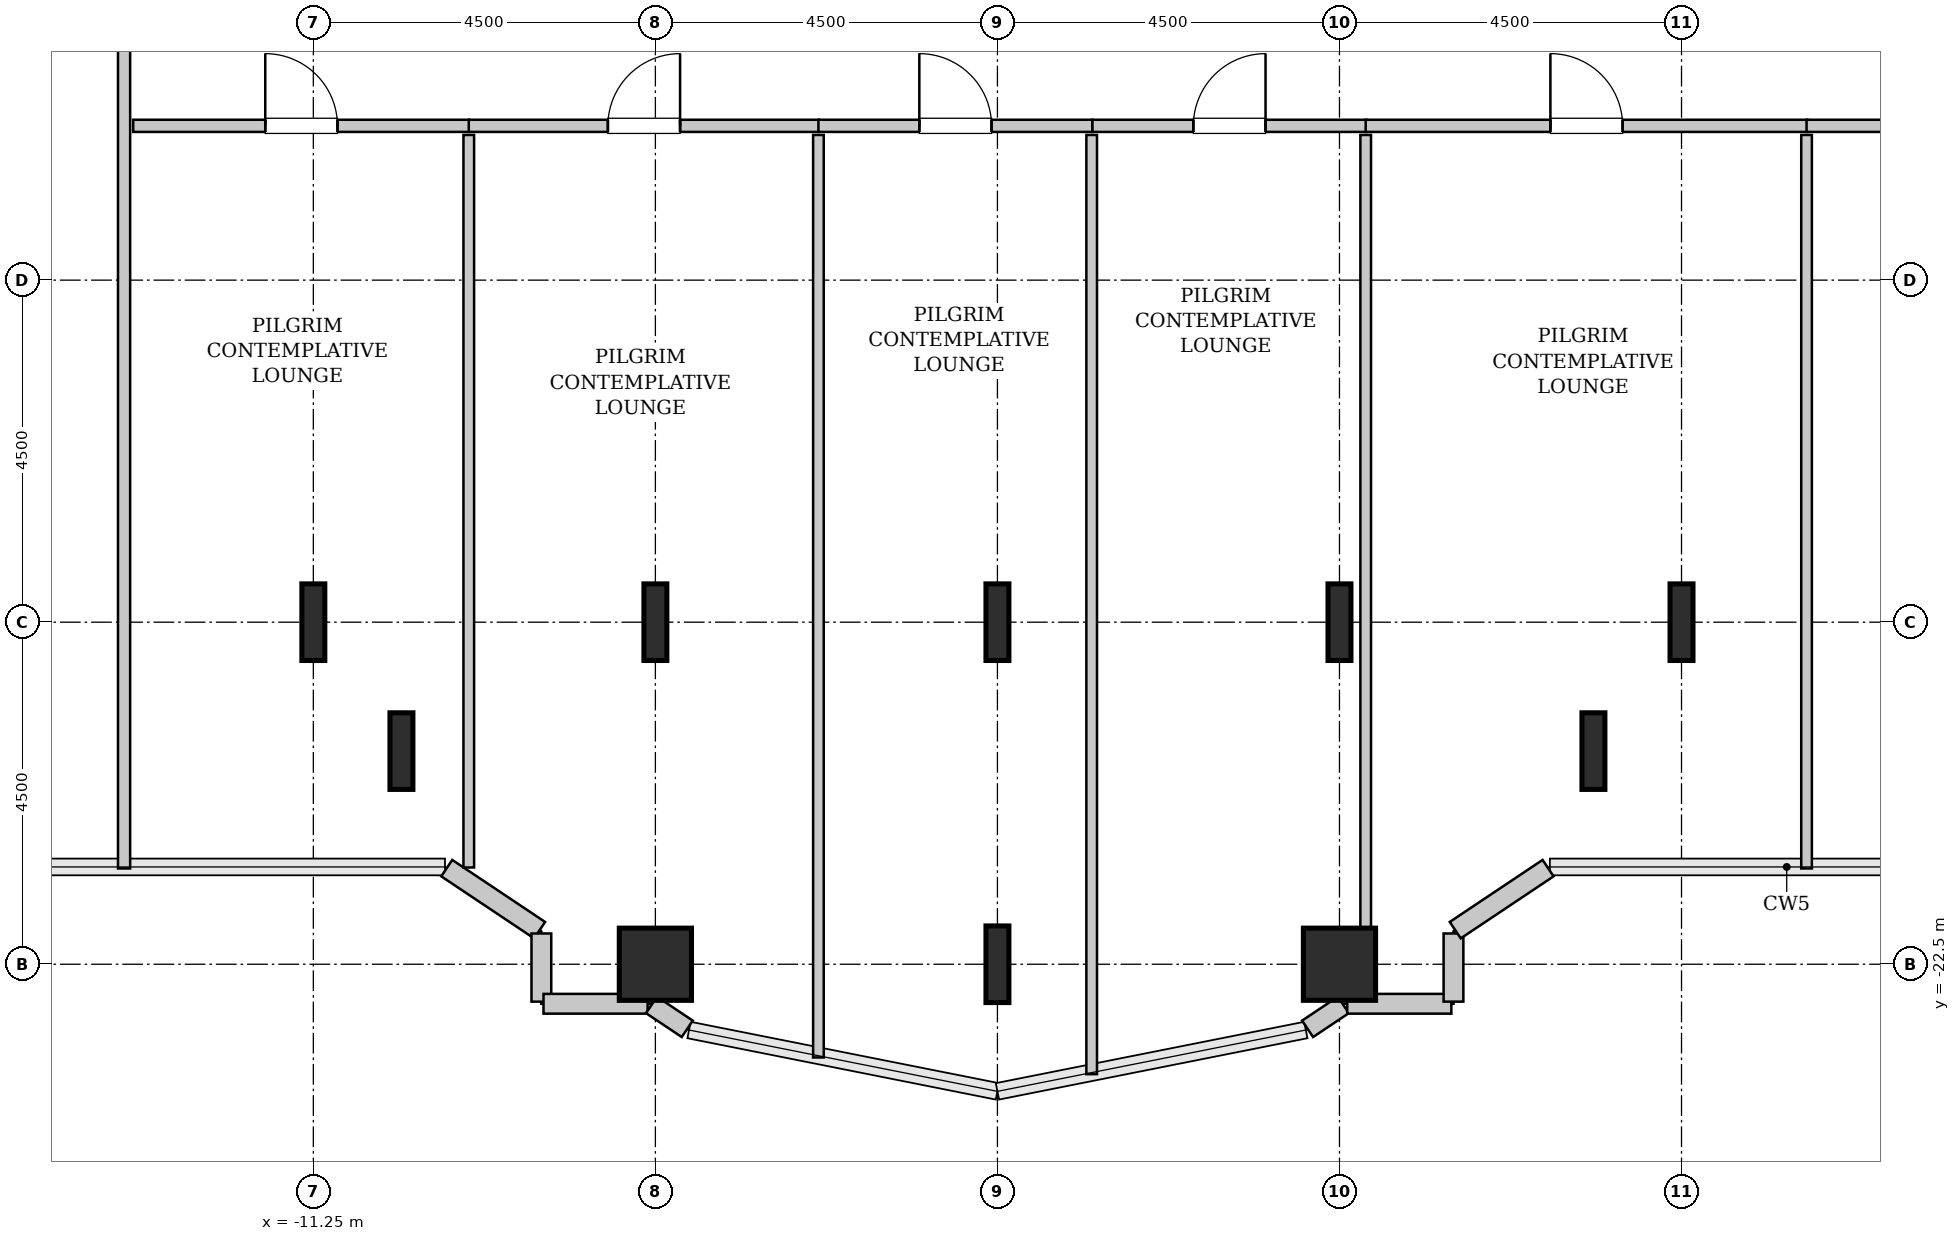
"""IFC4 building model, lengths in metres.
Left out: names, types, materials, properties, quantities, classifications, styles, units other than length and angle.
Written with IfcOpenShell. Run it as: python <this file> out.ifc"""

import sys

from ifc_helpers import new_model, si_unit, direction, frame, frame_2d, origin, origin_2d, place, context, subcontext, project, spatial, rectangle, hollow_rectangle, i_section, extrude, source, transform, mapped, element, fill, save


model = new_model("IFC4")
c1 = context("Model", 3, precision=1e-05, world=origin(), true_north=direction((0.0, 1.0)))
c2 = subcontext(c1, "Body", "Model", "MODEL_VIEW")
j1 = project(units=[si_unit("LENGTHUNIT", "METRE"), si_unit("PLANEANGLEUNIT", "RADIAN")], contexts=[c1])
p1 = place(None, origin())
s1 = spatial("IfcSite", under=j1, at=p1, CompositionType="ELEMENT")
p2 = place(p1, origin())
s2 = spatial("IfcBuilding", under=s1, at=p2, CompositionType="ELEMENT")
p3 = place(p2, frame((0.0, 0.0, 36.8)))
s3 = spatial("IfcBuildingStorey", under=s2, at=p3, CompositionType="ELEMENT", Elevation=36.8)
m1 = source(origin(), c2, "Body", "SweptSolid", [
    extrude(i_section(OverallWidth=0.302, OverallDepth=1.008, WebThickness=0.021, FlangeThickness=0.04, FilletRadius=0.03, at=origin_2d()), origin(), (0.0, 0.0, 1.0), 3.8),
])
for number, where, z_axis, x_axis in (
    (1, (-11.25, -18.0, 0.0), (0.0, 0.0, 1.0), (1.0, 0.0, 0.0)),
    (2, (-10.091, -19.696, 0.0), (0.0, 0.0, 1.0), (1.0, 0.0, 0.0)),
):
    element("IfcColumn", number, at=place(p3, frame(where, z_axis=z_axis, x_axis=x_axis)), inside=s3, PredefinedType="COLUMN", context=c2, shape_type="MappedRepresentation", body=[
        mapped(m1, transform((0.0, 0.0, 0.0), x_axis=(1.0, 0.0, 0.0), y_axis=(0.0, 1.0, 0.0), z_axis=(0.0, 0.0, 1.0), scale=1.0)),
    ])
m2 = source(origin(), c2, "Body", "SweptSolid", [
    extrude(hollow_rectangle(XDim=0.95, YDim=0.95, WallThickness=0.045, InnerFilletRadius=0.045, OuterFilletRadius=0.09, at=origin_2d()), origin(), (0.0, 0.0, 1.0), 3.8),
])
p4 = place(p3, frame((-6.75, -22.5, 0.0), z_axis=(0.0, 0.0, 1.0), x_axis=(1.0, 0.0, 0.0)))
e3 = element("IfcColumn", 3, at=p4, inside=s3, PredefinedType="COLUMN", context=c2, shape_type="MappedRepresentation", body=[
    mapped(m2, transform((0.0, 0.0, 0.0), x_axis=(1.0, 0.0, 0.0), y_axis=(0.0, 1.0, 0.0), z_axis=(0.0, 0.0, 1.0), scale=1.0)),
])
for number, where, z_axis, x_axis in (
    (4, (-6.75, -18.0, 0.0), (0.0, 0.0, 1.0), (1.0, 0.0, 0.0)),
    (5, (-2.25, -22.5, 0.0), (0.0, 0.0, 1.0), (1.0, 0.0, 0.0)),
    (6, (-2.25, -18.0, 0.0), (0.0, 0.0, 1.0), (1.0, 0.0, 0.0)),
):
    element("IfcColumn", number, at=place(p3, frame(where, z_axis=z_axis, x_axis=x_axis)), inside=s3, PredefinedType="COLUMN", context=c2, shape_type="MappedRepresentation", body=[
        mapped(m1, transform((0.0, 0.0, 0.0), x_axis=(1.0, 0.0, 0.0), y_axis=(0.0, 1.0, 0.0), z_axis=(0.0, 0.0, 1.0), scale=1.0)),
    ])
p5 = place(p3, frame((2.25, -22.5, 0.0), z_axis=(0.0, 0.0, 1.0), x_axis=(1.0, 0.0, 0.0)))
e7 = element("IfcColumn", 7, at=p5, inside=s3, PredefinedType="COLUMN", context=c2, shape_type="MappedRepresentation", body=[
    mapped(m2, transform((0.0, 0.0, 0.0), x_axis=(1.0, 0.0, 0.0), y_axis=(0.0, 1.0, 0.0), z_axis=(0.0, 0.0, 1.0), scale=1.0)),
])
for number, where, z_axis, x_axis in (
    (8, (2.25, -18.0, 0.0), (0.0, 0.0, 1.0), (1.0, 0.0, 0.0)),
    (9, (5.591, -19.696, 0.0), (0.0, 0.0, 1.0), (1.0, 0.0, 0.0)),
    (10, (6.75, -18.0, 0.0), (0.0, 0.0, 1.0), (1.0, 0.0, 0.0)),
):
    element("IfcColumn", number, at=place(p3, frame(where, z_axis=z_axis, x_axis=x_axis)), inside=s3, PredefinedType="COLUMN", context=c2, shape_type="MappedRepresentation", body=[
        mapped(m1, transform((0.0, 0.0, 0.0), x_axis=(1.0, 0.0, 0.0), y_axis=(0.0, 1.0, 0.0), z_axis=(0.0, 0.0, 1.0), scale=1.0)),
    ])
m3 = source(origin(), c2, "Body", "SweptSolid", [
    extrude(rectangle(XDim=1.469, YDim=0.26, at=frame_2d((0.734, 0.0))), origin(), (0.0, 0.0, 1.0), 3.55),
])
p6 = place(p3, frame((-9.495, -21.236, 0.0), z_axis=(0.0, 0.0, 1.0), x_axis=(0.831461760506, -0.555581983884, 0.0)))
e11 = element("IfcWall", 11, at=p6, inside=s3, PredefinedType="SOLIDWALL", context=c2, shape_type="MappedRepresentation", body=[
    mapped(m3, transform((0.0, 0.0, 0.0), x_axis=(1.0, 0.0, 0.0), y_axis=(0.0, 1.0, 0.0), z_axis=(0.0, 0.0, 1.0), scale=1.0)),
])
m4 = source(origin(), c2, "Body", "SweptSolid", [
    extrude(rectangle(XDim=0.897, YDim=0.26, at=frame_2d((0.448, 0.0))), origin(), (0.0, 0.0, 1.0), 3.55),
])
p7 = place(p3, frame((-8.25, -22.095, 0.0), z_axis=(0.0, 0.0, 1.0), x_axis=(0.0, -1.0, 0.0)))
e12 = element("IfcWall", 12, at=p7, inside=s3, PredefinedType="SOLIDWALL", context=c2, shape_type="MappedRepresentation", body=[
    mapped(m4, transform((0.0, 0.0, 0.0), x_axis=(1.0, 0.0, 0.0), y_axis=(0.0, 1.0, 0.0), z_axis=(0.0, 0.0, 1.0), scale=1.0)),
])
m5 = source(origin(), c2, "Body", "SweptSolid", [
    extrude(rectangle(XDim=1.37, YDim=0.26, at=frame_2d((0.685, 0.0))), origin(), (0.0, 0.0, 1.0), 3.55),
])
p8 = place(p3, frame((-8.222, -23.02, 0.0), z_axis=(0.0, 0.0, 1.0), x_axis=(1.0, 0.0, 0.0)))
e13 = element("IfcWall", 13, at=p8, inside=s3, PredefinedType="SOLIDWALL", context=c2, shape_type="MappedRepresentation", body=[
    mapped(m5, transform((0.0, 0.0, 0.0), x_axis=(1.0, 0.0, 0.0), y_axis=(0.0, 1.0, 0.0), z_axis=(0.0, 0.0, 1.0), scale=1.0)),
])
m6 = source(origin(), c2, "Body", "SweptSolid", [
    extrude(rectangle(XDim=0.565, YDim=0.26, at=frame_2d((0.283, 0.0))), origin(), (0.0, 0.0, 1.0), 3.55),
])
for number, where, z_axis, x_axis in (
    (14, (-6.801, -23.036, 0.0), (0.0, 0.0, 1.0), (0.832, -0.555, 0.0)),
    (15, (1.831, -23.35, 0.0), (0.0, 0.0, 1.0), (0.832, 0.555, 0.0)),
):
    element("IfcWall", number, at=place(p3, frame(where, z_axis=z_axis, x_axis=x_axis)), inside=s3, PredefinedType="SOLIDWALL", context=c2, shape_type="MappedRepresentation", body=[
        mapped(m6, transform((0.0, 0.0, 0.0), x_axis=(1.0, 0.0, 0.0), y_axis=(0.0, 1.0, 0.0), z_axis=(0.0, 0.0, 1.0), scale=1.0)),
    ])
p9 = place(p3, frame((2.352, -23.02, 0.0), z_axis=(0.0, 0.0, 1.0), x_axis=(1.0, 0.0, 0.0)))
e16 = element("IfcWall", 16, at=p9, inside=s3, PredefinedType="SOLIDWALL", context=c2, shape_type="MappedRepresentation", body=[
    mapped(m5, transform((0.0, 0.0, 0.0), x_axis=(1.0, 0.0, 0.0), y_axis=(0.0, 1.0, 0.0), z_axis=(0.0, 0.0, 1.0), scale=1.0)),
])
p10 = place(p3, frame((3.75, -22.992, 0.0), z_axis=(0.0, 0.0, 1.0), x_axis=(0.0, 1.0, 0.0)))
e17 = element("IfcWall", 17, at=p10, inside=s3, PredefinedType="SOLIDWALL", context=c2, shape_type="MappedRepresentation", body=[
    mapped(m4, transform((0.0, 0.0, 0.0), x_axis=(1.0, 0.0, 0.0), y_axis=(0.0, 1.0, 0.0), z_axis=(0.0, 0.0, 1.0), scale=1.0)),
])
p11 = place(p3, frame((3.773, -22.052, 0.0), z_axis=(0.0, 0.0, 1.0), x_axis=(0.831461760506, 0.555581983884, 0.0)))
e18 = element("IfcWall", 18, at=p11, inside=s3, PredefinedType="SOLIDWALL", context=c2, shape_type="MappedRepresentation", body=[
    mapped(m3, transform((0.0, 0.0, 0.0), x_axis=(1.0, 0.0, 0.0), y_axis=(0.0, 1.0, 0.0), z_axis=(0.0, 0.0, 1.0), scale=1.0)),
])
m7 = source(origin(), c2, "Body", "SweptSolid", [
    extrude(rectangle(XDim=13.045, YDim=0.16, at=frame_2d((6.522, 0.0))), origin(), (0.0, 0.0, 1.0), 3.535),
])
p12 = place(p3, frame((-13.74, -21.24, 0.0), z_axis=(0.0, 0.0, 1.0), x_axis=(0.0, 1.0, 0.0)))
e19 = element("IfcWall", 19, at=p12, inside=s3, PredefinedType="PARTITIONING", context=c2, shape_type="MappedRepresentation", body=[
    mapped(m7, transform((0.0, 0.0, 0.0), x_axis=(1.0, 0.0, 0.0), y_axis=(0.0, 1.0, 0.0), z_axis=(0.0, 0.0, 1.0), scale=1.0)),
])
p13 = place(p12, frame((10.913, 0.0, 0.0)))
e20 = element("IfcOpeningElement", 20, at=p13, cuts=e19, PredefinedType="OPENING", context=c2, shape_type="SweptSolid", body=[
    extrude(rectangle(XDim=0.95, YDim=2.1, at=frame_2d((0.475, 1.05))), frame((0.0, 0.09, 0.0), z_axis=(0.0, -1.0, 0.0), x_axis=(1.0, 0.0, 0.0)), (0.0, 0.0, 1.0), 0.18),
])
m8 = source(origin(), c2, "Body", "SweptSolid", [
    extrude(rectangle(XDim=4.425, YDim=0.16, at=frame_2d((2.212, 0.0))), origin(), (0.0, 0.0, 1.0), 3.535),
])
p14 = place(p3, frame((-13.62, -11.47, 0.0), z_axis=(0.0, 0.0, 1.0), x_axis=(1.0, 0.0, 0.0)))
e21 = element("IfcWall", 21, at=p14, inside=s3, PredefinedType="PARTITIONING", context=c2, shape_type="MappedRepresentation", body=[
    mapped(m8, transform((0.0, 0.0, 0.0), x_axis=(1.0, 0.0, 0.0), y_axis=(0.0, 1.0, 0.0), z_axis=(0.0, 0.0, 1.0), scale=1.0)),
])
p15 = place(p14, frame((1.738, 0.0, 0.0)))
e22 = element("IfcOpeningElement", 22, at=p15, cuts=e21, PredefinedType="OPENING", context=c2, shape_type="SweptSolid", body=[
    extrude(rectangle(XDim=0.95, YDim=2.1, at=frame_2d((0.475, 1.05))), frame((0.0, 0.09, 0.0), z_axis=(0.0, -1.0, 0.0), x_axis=(1.0, 0.0, 0.0)), (0.0, 0.0, 1.0), 0.18),
])
m9 = source(origin(), c2, "Body", "SweptSolid", [
    extrude(rectangle(XDim=9.637, YDim=0.14, at=frame_2d((4.818, 0.0))), origin(), (0.0, 0.0, 1.0), 3.535),
])
p16 = place(p3, frame((-9.205, -21.227, 0.0), z_axis=(0.0, 0.0, 1.0), x_axis=(0.0, 1.0, 0.0)))
e23 = element("IfcWall", 23, at=p16, inside=s3, PredefinedType="PARTITIONING", context=c2, shape_type="MappedRepresentation", body=[
    mapped(m9, transform((0.0, 0.0, 0.0), x_axis=(1.0, 0.0, 0.0), y_axis=(0.0, 1.0, 0.0), z_axis=(0.0, 0.0, 1.0), scale=1.0)),
])
m10 = source(origin(), c2, "Body", "SweptSolid", [
    extrude(rectangle(XDim=4.61, YDim=0.16, at=frame_2d((2.305, 0.0))), origin(), (0.0, 0.0, 1.0), 3.535),
])
p17 = place(p3, frame((-9.205, -11.47, 0.0), z_axis=(0.0, 0.0, 1.0), x_axis=(1.0, 0.0, 0.0)))
e24 = element("IfcWall", 24, at=p17, inside=s3, PredefinedType="PARTITIONING", context=c2, shape_type="MappedRepresentation", body=[
    mapped(m10, transform((0.0, 0.0, 0.0), x_axis=(1.0, 0.0, 0.0), y_axis=(0.0, 1.0, 0.0), z_axis=(0.0, 0.0, 1.0), scale=1.0)),
])
p18 = place(p17, frame((1.83, 0.0, 0.0)))
e25 = element("IfcOpeningElement", 25, at=p18, cuts=e24, PredefinedType="OPENING", context=c2, shape_type="SweptSolid", body=[
    extrude(rectangle(XDim=0.95, YDim=2.1, at=frame_2d((0.475, 1.05))), frame((0.0, 0.09, 0.0), z_axis=(0.0, -1.0, 0.0), x_axis=(1.0, 0.0, 0.0)), (0.0, 0.0, 1.0), 0.18),
])
m11 = source(origin(), c2, "Body", "SweptSolid", [
    extrude(rectangle(XDim=12.136, YDim=0.14, at=frame_2d((6.068, 0.0))), origin(), (0.0, 0.0, 1.0), 3.535),
])
p19 = place(p3, frame((-4.605, -23.726, 0.0), z_axis=(0.0, 0.0, 1.0), x_axis=(0.0, 1.0, 0.0)))
e26 = element("IfcWall", 26, at=p19, inside=s3, PredefinedType="PARTITIONING", context=c2, shape_type="MappedRepresentation", body=[
    mapped(m11, transform((0.0, 0.0, 0.0), x_axis=(1.0, 0.0, 0.0), y_axis=(0.0, 1.0, 0.0), z_axis=(0.0, 0.0, 1.0), scale=1.0)),
])
m12 = source(origin(), c2, "Body", "SweptSolid", [
    extrude(rectangle(XDim=3.605, YDim=0.16, at=frame_2d((1.802, 0.0))), origin(), (0.0, 0.0, 1.0), 3.535),
])
p20 = place(p3, frame((-4.605, -11.47, 0.0), z_axis=(0.0, 0.0, 1.0), x_axis=(1.0, 0.0, 0.0)))
e27 = element("IfcWall", 27, at=p20, inside=s3, PredefinedType="PARTITIONING", context=c2, shape_type="MappedRepresentation", body=[
    mapped(m12, transform((0.0, 0.0, 0.0), x_axis=(1.0, 0.0, 0.0), y_axis=(0.0, 1.0, 0.0), z_axis=(0.0, 0.0, 1.0), scale=1.0)),
])
p21 = place(p20, frame((1.327, 0.0, 0.0)))
e28 = element("IfcOpeningElement", 28, at=p21, cuts=e27, PredefinedType="OPENING", context=c2, shape_type="SweptSolid", body=[
    extrude(rectangle(XDim=0.95, YDim=2.1, at=frame_2d((0.475, 1.05))), frame((0.0, 0.09, 0.0), z_axis=(0.0, -1.0, 0.0), x_axis=(1.0, 0.0, 0.0)), (0.0, 0.0, 1.0), 0.18),
])
m13 = source(origin(), c2, "Body", "SweptSolid", [
    extrude(rectangle(XDim=12.356, YDim=0.14, at=frame_2d((6.178, 0.0))), origin(), (0.0, 0.0, 1.0), 3.535),
])
p22 = place(p3, frame((-1.01, -23.946, 0.0), z_axis=(0.0, 0.0, 1.0), x_axis=(0.0, 1.0, 0.0)))
e29 = element("IfcWall", 29, at=p22, inside=s3, PredefinedType="PARTITIONING", context=c2, shape_type="MappedRepresentation", body=[
    mapped(m13, transform((0.0, 0.0, 0.0), x_axis=(1.0, 0.0, 0.0), y_axis=(0.0, 1.0, 0.0), z_axis=(0.0, 0.0, 1.0), scale=1.0)),
])
p23 = place(p3, frame((-1.0, -11.47, 0.0), z_axis=(0.0, 0.0, 1.0), x_axis=(1.0, 0.0, 0.0)))
e30 = element("IfcWall", 30, at=p23, inside=s3, PredefinedType="PARTITIONING", context=c2, shape_type="MappedRepresentation", body=[
    mapped(m12, transform((0.0, 0.0, 0.0), x_axis=(1.0, 0.0, 0.0), y_axis=(0.0, 1.0, 0.0), z_axis=(0.0, 0.0, 1.0), scale=1.0)),
])
p24 = place(p23, frame((1.327, 0.0, 0.0)))
e31 = element("IfcOpeningElement", 31, at=p24, cuts=e30, PredefinedType="OPENING", context=c2, shape_type="SweptSolid", body=[
    extrude(rectangle(XDim=0.95, YDim=2.1, at=frame_2d((0.475, 1.05))), frame((0.0, 0.09, 0.0), z_axis=(0.0, -1.0, 0.0), x_axis=(1.0, 0.0, 0.0)), (0.0, 0.0, 1.0), 0.18),
])
m14 = source(origin(), c2, "Body", "SweptSolid", [
    extrude(rectangle(XDim=11.26, YDim=0.14, at=frame_2d((5.63, 0.0))), origin(), (0.0, 0.0, 1.0), 2.825),
])
p25 = place(p3, frame((2.595, -22.85, 0.0), z_axis=(0.0, 0.0, 1.0), x_axis=(0.0, 1.0, 0.0)))
e32 = element("IfcWall", 32, at=p25, inside=s3, PredefinedType="PARTITIONING", context=c2, shape_type="MappedRepresentation", body=[
    mapped(m14, transform((0.0, 0.0, 0.0), x_axis=(1.0, 0.0, 0.0), y_axis=(0.0, 1.0, 0.0), z_axis=(0.0, 0.0, 1.0), scale=1.0)),
])
m15 = source(origin(), c2, "Body", "SweptSolid", [
    extrude(rectangle(XDim=5.81, YDim=0.16, at=frame_2d((2.905, 0.0))), origin(), (0.0, 0.0, 1.0), 3.535),
])
p26 = place(p3, frame((2.595, -11.47, 0.0), z_axis=(0.0, 0.0, 1.0), x_axis=(1.0, 0.0, 0.0)))
e33 = element("IfcWall", 33, at=p26, inside=s3, PredefinedType="PARTITIONING", context=c2, shape_type="MappedRepresentation", body=[
    mapped(m15, transform((0.0, 0.0, 0.0), x_axis=(1.0, 0.0, 0.0), y_axis=(0.0, 1.0, 0.0), z_axis=(0.0, 0.0, 1.0), scale=1.0)),
])
p27 = place(p26, frame((2.43, 0.0, 0.0)))
e34 = element("IfcOpeningElement", 34, at=p27, cuts=e33, PredefinedType="OPENING", context=c2, shape_type="SweptSolid", body=[
    extrude(rectangle(XDim=0.95, YDim=2.1, at=frame_2d((0.475, 1.05))), frame((0.0, 0.09, 0.0), z_axis=(0.0, -1.0, 0.0), x_axis=(1.0, 0.0, 0.0)), (0.0, 0.0, 1.0), 0.18),
])
m16 = source(origin(), c2, "Body", "SweptSolid", [
    extrude(rectangle(XDim=9.65, YDim=0.14, at=frame_2d((4.825, 0.0))), origin(), (0.0, 0.0, 1.0), 3.535),
])
p28 = place(p3, frame((8.395, -21.24, 0.0), z_axis=(0.0, 0.0, 1.0), x_axis=(0.0, 1.0, 0.0)))
e35 = element("IfcWall", 35, at=p28, inside=s3, PredefinedType="PARTITIONING", context=c2, shape_type="MappedRepresentation", body=[
    mapped(m16, transform((0.0, 0.0, 0.0), x_axis=(1.0, 0.0, 0.0), y_axis=(0.0, 1.0, 0.0), z_axis=(0.0, 0.0, 1.0), scale=1.0)),
])
m17 = source(origin(), c2, "Body", "SweptSolid", [
    extrude(rectangle(XDim=5.225, YDim=0.16, at=frame_2d((2.613, 0.0))), origin(), (0.0, 0.0, 1.0), 3.535),
])
p29 = place(p3, frame((8.395, -11.47, 0.0), z_axis=(0.0, 0.0, 1.0), x_axis=(1.0, 0.0, 0.0)))
e36 = element("IfcWall", 36, at=p29, inside=s3, PredefinedType="PARTITIONING", context=c2, shape_type="MappedRepresentation", body=[
    mapped(m17, transform((0.0, 0.0, 0.0), x_axis=(1.0, 0.0, 0.0), y_axis=(0.0, 1.0, 0.0), z_axis=(0.0, 0.0, 1.0), scale=1.0)),
])
p30 = place(p29, frame((2.137, 0.0, 0.0)))
e37 = element("IfcOpeningElement", 37, at=p30, cuts=e36, PredefinedType="OPENING", context=c2, shape_type="SweptSolid", body=[
    extrude(rectangle(XDim=0.95, YDim=2.1, at=frame_2d((0.475, 1.05))), frame((0.0, 0.09, 0.0), z_axis=(0.0, -1.0, 0.0), x_axis=(1.0, 0.0, 0.0)), (0.0, 0.0, 1.0), 0.18),
])
m18 = source(origin(), c2, "Body", "SweptSolid", [
    extrude(rectangle(XDim=0.95, YDim=2.1, at=frame_2d((0.475, 1.05))), frame((0.0, 0.025, 0.0), z_axis=(0.0, -1.0, 0.0), x_axis=(1.0, 0.0, 0.0)), (0.0, 0.0, 1.0), 0.05),
])
p31 = place(p15, origin())
e38 = element("IfcDoor", 38, at=p31, inside=s3, OperationType="SINGLE_SWING_LEFT", PredefinedType="DOOR", context=c2, shape_type="MappedRepresentation", body=[
    mapped(m18, transform((0.0, 0.0, 0.0), x_axis=(1.0, 0.0, 0.0), y_axis=(0.0, 1.0, 0.0), z_axis=(0.0, 0.0, 1.0), scale=1.0)),
])
fill(e22, e38)
p32 = place(p18, origin())
e39 = element("IfcDoor", 39, at=p32, inside=s3, OperationType="SINGLE_SWING_RIGHT", PredefinedType="DOOR", context=c2, shape_type="MappedRepresentation", body=[
    mapped(m18, transform((0.0, 0.0, 0.0), x_axis=(1.0, 0.0, 0.0), y_axis=(0.0, 1.0, 0.0), z_axis=(0.0, 0.0, 1.0), scale=1.0)),
])
fill(e25, e39)
p33 = place(p21, origin())
e40 = element("IfcDoor", 40, at=p33, inside=s3, OperationType="SINGLE_SWING_LEFT", PredefinedType="DOOR", context=c2, shape_type="MappedRepresentation", body=[
    mapped(m18, transform((0.0, 0.0, 0.0), x_axis=(1.0, 0.0, 0.0), y_axis=(0.0, 1.0, 0.0), z_axis=(0.0, 0.0, 1.0), scale=1.0)),
])
fill(e28, e40)
p34 = place(p24, origin())
e41 = element("IfcDoor", 41, at=p34, inside=s3, OperationType="SINGLE_SWING_RIGHT", PredefinedType="DOOR", context=c2, shape_type="MappedRepresentation", body=[
    mapped(m18, transform((0.0, 0.0, 0.0), x_axis=(1.0, 0.0, 0.0), y_axis=(0.0, 1.0, 0.0), z_axis=(0.0, 0.0, 1.0), scale=1.0)),
])
fill(e31, e41)
p35 = place(p27, origin())
e42 = element("IfcDoor", 42, at=p35, inside=s3, OperationType="SINGLE_SWING_LEFT", PredefinedType="DOOR", context=c2, shape_type="MappedRepresentation", body=[
    mapped(m18, transform((0.0, 0.0, 0.0), x_axis=(1.0, 0.0, 0.0), y_axis=(0.0, 1.0, 0.0), z_axis=(0.0, 0.0, 1.0), scale=1.0)),
])
fill(e34, e42)
save(model, sys.argv[1])
